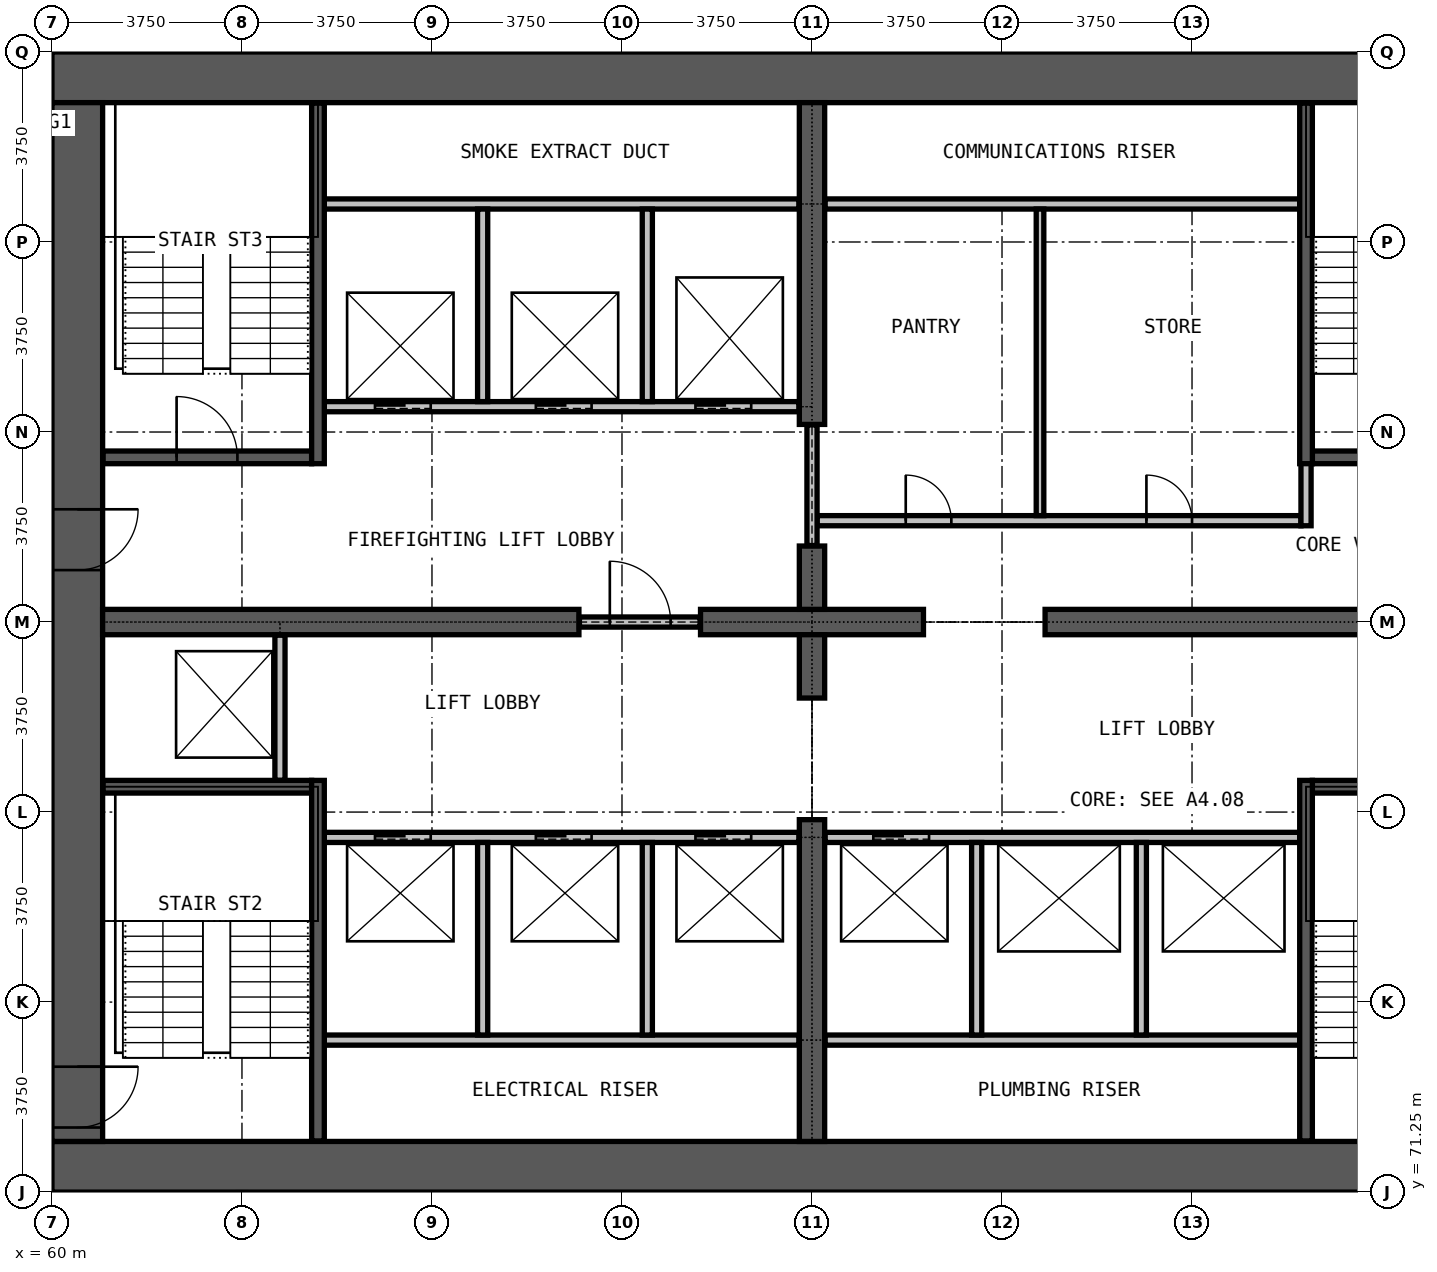
"""IFC4 building model, lengths in metres.
Left out: names, types, materials, properties, quantities, classifications, styles, units other than length and angle.
Written with IfcOpenShell. Run it as: python <this file> out.ifc"""

import sys

from ifc_helpers import new_model, si_unit, direction, frame, frame_2d, origin, place, context, subcontext, project, spatial, rectangle, extrude, element, fill, save


model = new_model("IFC4")
c1 = context("Model", 3, precision=1e-05, world=origin(), true_north=direction((0.0, 1.0)))
c2 = subcontext(c1, "Body", "Model", "MODEL_VIEW")
j1 = project(units=[si_unit("LENGTHUNIT", "METRE"), si_unit("PLANEANGLEUNIT", "RADIAN")], contexts=[c1])
p1 = place(None, origin())
s1 = spatial("IfcSite", under=j1, at=p1, CompositionType="ELEMENT")
p2 = place(p1, origin())
s2 = spatial("IfcBuilding", under=s1, at=p2, CompositionType="ELEMENT")
p3 = place(p2, frame((0.0, 0.0, 79.1)))
s3 = spatial("IfcBuildingStorey", under=s2, at=p3, CompositionType="ELEMENT", Elevation=79.1)
for number, where, z_axis, x_axis in (
    (1, (60.0, 71.75, 0.0), (0.0, 0.0, 1.0), (1.0, 0.0, 0.0)),
    (2, (90.0, 93.25, 0.0), (0.0, 0.0, 1.0), (-1.0, 0.0, 0.0)),
):
    element("IfcWall", number, at=place(p3, frame(where, z_axis=z_axis, x_axis=x_axis)), inside=s3, PredefinedType="SHEAR", context=c2, shape_type="SweptSolid", body=[
        extrude(rectangle(XDim=30.0, YDim=1.0, at=frame_2d((15.0, 0.0))), origin(), (0.0, 0.0, 1.0), 3.3),
    ])
p4 = place(p3, frame((60.5, 92.75, 0.0), z_axis=(0.0, 0.0, 1.0), x_axis=(0.0, -1.0, 0.0)))
e3 = element("IfcWall", 3, at=p4, inside=s3, PredefinedType="SHEAR", context=c2, shape_type="SweptSolid", body=[
    extrude(rectangle(XDim=20.5, YDim=1.0, at=frame_2d((10.25, 0.0))), origin(), (0.0, 0.0, 1.0), 3.3),
])
p5 = place(p4, frame((19.025, 0.0, 0.0)))
e4 = element("IfcOpeningElement", 4, at=p5, cuts=e3, PredefinedType="OPENING", context=c2, shape_type="SweptSolid", body=[
    extrude(rectangle(XDim=1.2, YDim=2.2, at=frame_2d((0.6, 1.1))), frame((0.0, 0.51, 0.0), z_axis=(0.0, -1.0, 0.0), x_axis=(1.0, 0.0, 0.0)), (0.0, 0.0, 1.0), 1.02),
])
p6 = place(p4, frame((8.025, 0.0, 0.0)))
e5 = element("IfcOpeningElement", 5, at=p6, cuts=e3, PredefinedType="OPENING", context=c2, shape_type="SweptSolid", body=[
    extrude(rectangle(XDim=1.2, YDim=2.2, at=frame_2d((0.6, 1.1))), frame((0.0, 0.51, 0.0), z_axis=(0.0, -1.0, 0.0), x_axis=(1.0, 0.0, 0.0)), (0.0, 0.0, 1.0), 1.02),
])
p7 = place(p3, frame((61.0, 82.5, 0.0), z_axis=(0.0, 0.0, 1.0), x_axis=(1.0, 0.0, 0.0)))
e6 = element("IfcWall", 6, at=p7, inside=s3, PredefinedType="SHEAR", context=c2, shape_type="SweptSolid", body=[
    extrude(rectangle(XDim=9.4, YDim=0.5, at=frame_2d((4.7, 0.0))), origin(), (0.0, 0.0, 1.0), 3.3),
])
p8 = place(p3, frame((72.8, 82.5, 0.0), z_axis=(0.0, 0.0, 1.0), x_axis=(1.0, 0.0, 0.0)))
e7 = element("IfcWall", 7, at=p8, inside=s3, PredefinedType="SHEAR", context=c2, shape_type="SweptSolid", body=[
    extrude(rectangle(XDim=4.4, YDim=0.5, at=frame_2d((2.2, 0.0))), origin(), (0.0, 0.0, 1.0), 3.3),
])
p9 = place(p3, frame((79.6, 82.5, 0.0), z_axis=(0.0, 0.0, 1.0), x_axis=(1.0, 0.0, 0.0)))
e8 = element("IfcWall", 8, at=p9, inside=s3, PredefinedType="SHEAR", context=c2, shape_type="SweptSolid", body=[
    extrude(rectangle(XDim=9.4, YDim=0.5, at=frame_2d((4.7, 0.0))), origin(), (0.0, 0.0, 1.0), 3.3),
])
p10 = place(p3, frame((75.0, 72.25, 0.0), z_axis=(0.0, 0.0, 1.0), x_axis=(0.0, 1.0, 0.0)))
e9 = element("IfcWall", 9, at=p10, inside=s3, PredefinedType="SHEAR", context=c2, shape_type="SweptSolid", body=[
    extrude(rectangle(XDim=6.35, YDim=0.5, at=frame_2d((3.175, 0.0))), origin(), (0.0, 0.0, 1.0), 3.3),
])
for number, where, z_axis, x_axis in (
    (10, (75.0, 81.0, 0.0), (0.0, 0.0, 1.0), (0.0, 1.0, 0.0)),
    (11, (75.0, 82.75, 0.0), (0.0, 0.0, 1.0), (0.0, 1.0, 0.0)),
):
    element("IfcWall", number, at=place(p3, frame(where, z_axis=z_axis, x_axis=x_axis)), inside=s3, PredefinedType="SHEAR", context=c2, shape_type="SweptSolid", body=[
        extrude(rectangle(XDim=1.25, YDim=0.5, at=frame_2d((0.625, 0.0))), origin(), (0.0, 0.0, 1.0), 3.3),
    ])
p11 = place(p3, frame((75.0, 86.4, 0.0), z_axis=(0.0, 0.0, 1.0), x_axis=(0.0, 1.0, 0.0)))
e12 = element("IfcWall", 12, at=p11, inside=s3, PredefinedType="SHEAR", context=c2, shape_type="SweptSolid", body=[
    extrude(rectangle(XDim=6.35, YDim=0.5, at=frame_2d((3.175, 0.0))), origin(), (0.0, 0.0, 1.0), 3.3),
])
p12 = place(p3, frame((70.41, 82.5, 0.0), z_axis=(0.0, 0.0, 1.0), x_axis=(1.0, 0.0, 0.0)))
e13 = element("IfcWall", 13, at=p12, inside=s3, PredefinedType="PARTITIONING", context=c2, shape_type="SweptSolid", body=[
    extrude(rectangle(XDim=2.38, YDim=0.2, at=frame_2d((1.19, 0.0))), origin(), (0.0, 0.0, 1.0), 2.4),
])
p13 = place(p12, frame((0.6, 0.0, 0.0)))
e14 = element("IfcOpeningElement", 14, at=p13, cuts=e13, PredefinedType="OPENING", context=c2, shape_type="SweptSolid", body=[
    extrude(rectangle(XDim=1.2, YDim=2.2, at=frame_2d((0.6, 1.1))), frame((0.0, 0.11, 0.0), z_axis=(0.0, -1.0, 0.0), x_axis=(1.0, 0.0, 0.0)), (0.0, 0.0, 1.0), 0.22),
])
p14 = place(p3, frame((75.1, 84.5, 0.0), z_axis=(0.0, 0.0, 1.0), x_axis=(1.0, 0.0, 0.0)))
e15 = element("IfcWall", 15, at=p14, inside=s3, PredefinedType="PARTITIONING", context=c2, shape_type="SweptSolid", body=[
    extrude(rectangle(XDim=9.55, YDim=0.2, at=frame_2d((4.775, 0.0))), origin(), (0.0, 0.0, 1.0), 3.0),
])
p15 = place(p14, frame((1.75, 0.0, 0.0)))
e16 = element("IfcOpeningElement", 16, at=p15, cuts=e15, PredefinedType="OPENING", context=c2, shape_type="SweptSolid", body=[
    extrude(rectangle(XDim=0.9, YDim=2.2, at=frame_2d((0.45, 1.1))), frame((0.0, 0.11, 0.0), z_axis=(0.0, -1.0, 0.0), x_axis=(1.0, 0.0, 0.0)), (0.0, 0.0, 1.0), 0.22),
])
p16 = place(p14, frame((6.5, 0.0, 0.0)))
e17 = element("IfcOpeningElement", 17, at=p16, cuts=e15, PredefinedType="OPENING", context=c2, shape_type="SweptSolid", body=[
    extrude(rectangle(XDim=0.9, YDim=2.2, at=frame_2d((0.45, 1.1))), frame((0.0, 0.11, 0.0), z_axis=(0.0, -1.0, 0.0), x_axis=(1.0, 0.0, 0.0)), (0.0, 0.0, 1.0), 0.22),
])
p17 = place(p3, frame((75.26, 90.75, 0.0), z_axis=(0.0, 0.0, 1.0), x_axis=(1.0, 0.0, 0.0)))
e18 = element("IfcWall", 18, at=p17, inside=s3, PredefinedType="PARTITIONING", context=c2, shape_type="SweptSolid", body=[
    extrude(rectangle(XDim=9.365, YDim=0.2, at=frame_2d((4.683, 0.0))), origin(), (0.0, 0.0, 1.0), 3.0),
])
p18 = place(p3, frame((75.0, 84.01, 0.0), z_axis=(0.0, 0.0, 1.0), x_axis=(0.0, 1.0, 0.0)))
e19 = element("IfcWall", 19, at=p18, inside=s3, PredefinedType="PARTITIONING", context=c2, shape_type="SweptSolid", body=[
    extrude(rectangle(XDim=2.38, YDim=0.2, at=frame_2d((1.19, 0.0))), origin(), (0.0, 0.0, 1.0), 2.4),
])
p19 = place(p3, frame((84.75, 84.4, 0.0), z_axis=(0.0, 0.0, 1.0), x_axis=(0.0, 1.0, 0.0)))
e20 = element("IfcWall", 20, at=p19, inside=s3, PredefinedType="PARTITIONING", context=c2, shape_type="SweptSolid", body=[
    extrude(rectangle(XDim=1.475, YDim=0.2, at=frame_2d((0.738, 0.0))), origin(), (0.0, 0.0, 1.0), 3.0),
])
p20 = place(p3, frame((79.5, 84.6, 0.0), z_axis=(0.0, 0.0, 1.0), x_axis=(0.0, 1.0, 0.0)))
e21 = element("IfcWall", 21, at=p20, inside=s3, PredefinedType="PARTITIONING", context=c2, shape_type="SweptSolid", body=[
    extrude(rectangle(XDim=6.05, YDim=0.15, at=frame_2d((3.025, 0.0))), origin(), (0.0, 0.0, 1.0), 3.0),
])
for number, where, z_axis, x_axis in (
    (22, (65.375, 74.25, 0.0), (0.0, 0.0, 1.0), (1.0, 0.0, 0.0)),
    (23, (75.26, 74.25, 0.0), (0.0, 0.0, 1.0), (1.0, 0.0, 0.0)),
):
    element("IfcWall", number, at=place(p3, frame(where, z_axis=z_axis, x_axis=x_axis)), inside=s3, PredefinedType="PARTITIONING", context=c2, shape_type="SweptSolid", body=[
        extrude(rectangle(XDim=9.365, YDim=0.2, at=frame_2d((4.683, 0.0))), origin(), (0.0, 0.0, 1.0), 3.0),
    ])
p21 = place(p3, frame((65.375, 78.25, 0.0), z_axis=(0.0, 0.0, 1.0), x_axis=(1.0, 0.0, 0.0)))
e24 = element("IfcWall", 24, at=p21, inside=s3, PredefinedType="PARTITIONING", context=c2, shape_type="SweptSolid", body=[
    extrude(rectangle(XDim=9.365, YDim=0.2, at=frame_2d((4.683, 0.0))), origin(), (0.0, 0.0, 1.0), 3.0),
])
p22 = place(p21, frame((1.0, 0.0, 0.0)))
e25 = element("IfcOpeningElement", 25, at=p22, cuts=e24, PredefinedType="OPENING", context=c2, shape_type="SweptSolid", body=[
    extrude(rectangle(XDim=1.1, YDim=2.2, at=frame_2d((0.55, 1.1))), frame((0.0, 0.11, 0.0), z_axis=(0.0, -1.0, 0.0), x_axis=(1.0, 0.0, 0.0)), (0.0, 0.0, 1.0), 0.22),
])
p23 = place(p21, frame((4.175, 0.0, 0.0)))
e26 = element("IfcOpeningElement", 26, at=p23, cuts=e24, PredefinedType="OPENING", context=c2, shape_type="SweptSolid", body=[
    extrude(rectangle(XDim=1.1, YDim=2.2, at=frame_2d((0.55, 1.1))), frame((0.0, 0.11, 0.0), z_axis=(0.0, -1.0, 0.0), x_axis=(1.0, 0.0, 0.0)), (0.0, 0.0, 1.0), 0.22),
])
p24 = place(p21, frame((7.325, 0.0, 0.0)))
e27 = element("IfcOpeningElement", 27, at=p24, cuts=e24, PredefinedType="OPENING", context=c2, shape_type="SweptSolid", body=[
    extrude(rectangle(XDim=1.1, YDim=2.2, at=frame_2d((0.55, 1.1))), frame((0.0, 0.11, 0.0), z_axis=(0.0, -1.0, 0.0), x_axis=(1.0, 0.0, 0.0)), (0.0, 0.0, 1.0), 0.22),
])
p25 = place(p3, frame((75.26, 78.25, 0.0), z_axis=(0.0, 0.0, 1.0), x_axis=(1.0, 0.0, 0.0)))
e28 = element("IfcWall", 28, at=p25, inside=s3, PredefinedType="PARTITIONING", context=c2, shape_type="SweptSolid", body=[
    extrude(rectangle(XDim=9.365, YDim=0.2, at=frame_2d((4.683, 0.0))), origin(), (0.0, 0.0, 1.0), 3.0),
])
p26 = place(p25, frame((0.95, 0.0, 0.0)))
e29 = element("IfcOpeningElement", 29, at=p26, cuts=e28, PredefinedType="OPENING", context=c2, shape_type="SweptSolid", body=[
    extrude(rectangle(XDim=1.1, YDim=2.2, at=frame_2d((0.55, 1.1))), frame((0.0, 0.11, 0.0), z_axis=(0.0, -1.0, 0.0), x_axis=(1.0, 0.0, 0.0)), (0.0, 0.0, 1.0), 0.22),
])
p27 = place(p3, frame((65.375, 86.75, 0.0), z_axis=(0.0, 0.0, 1.0), x_axis=(1.0, 0.0, 0.0)))
e30 = element("IfcWall", 30, at=p27, inside=s3, PredefinedType="PARTITIONING", context=c2, shape_type="SweptSolid", body=[
    extrude(rectangle(XDim=9.365, YDim=0.2, at=frame_2d((4.683, 0.0))), origin(), (0.0, 0.0, 1.0), 3.0),
])
p28 = place(p27, frame((1.0, 0.0, 0.0)))
e31 = element("IfcOpeningElement", 31, at=p28, cuts=e30, PredefinedType="OPENING", context=c2, shape_type="SweptSolid", body=[
    extrude(rectangle(XDim=1.1, YDim=2.2, at=frame_2d((0.55, 1.1))), frame((0.0, 0.11, 0.0), z_axis=(0.0, -1.0, 0.0), x_axis=(1.0, 0.0, 0.0)), (0.0, 0.0, 1.0), 0.22),
])
p29 = place(p27, frame((4.175, 0.0, 0.0)))
e32 = element("IfcOpeningElement", 32, at=p29, cuts=e30, PredefinedType="OPENING", context=c2, shape_type="SweptSolid", body=[
    extrude(rectangle(XDim=1.1, YDim=2.2, at=frame_2d((0.55, 1.1))), frame((0.0, 0.11, 0.0), z_axis=(0.0, -1.0, 0.0), x_axis=(1.0, 0.0, 0.0)), (0.0, 0.0, 1.0), 0.22),
])
p30 = place(p27, frame((7.325, 0.0, 0.0)))
e33 = element("IfcOpeningElement", 33, at=p30, cuts=e30, PredefinedType="OPENING", context=c2, shape_type="SweptSolid", body=[
    extrude(rectangle(XDim=1.1, YDim=2.2, at=frame_2d((0.55, 1.1))), frame((0.0, 0.11, 0.0), z_axis=(0.0, -1.0, 0.0), x_axis=(1.0, 0.0, 0.0)), (0.0, 0.0, 1.0), 0.22),
])
p31 = place(p3, frame((65.375, 90.75, 0.0), z_axis=(0.0, 0.0, 1.0), x_axis=(1.0, 0.0, 0.0)))
e34 = element("IfcWall", 34, at=p31, inside=s3, PredefinedType="PARTITIONING", context=c2, shape_type="SweptSolid", body=[
    extrude(rectangle(XDim=9.365, YDim=0.2, at=frame_2d((4.683, 0.0))), origin(), (0.0, 0.0, 1.0), 3.0),
])
p32 = place(p3, frame((64.5, 79.375, 0.0), z_axis=(0.0, 0.0, 1.0), x_axis=(0.0, 1.0, 0.0)))
e35 = element("IfcWall", 35, at=p32, inside=s3, PredefinedType="PARTITIONING", context=c2, shape_type="SweptSolid", body=[
    extrude(rectangle(XDim=2.865, YDim=0.2, at=frame_2d((1.433, 0.0))), origin(), (0.0, 0.0, 1.0), 3.0),
])
for number, where, z_axis, x_axis in (
    (36, (68.5, 74.35, 0.0), (0.0, 0.0, 1.0), (0.0, 1.0, 0.0)),
    (37, (68.5, 86.85, 0.0), (0.0, 0.0, 1.0), (0.0, 1.0, 0.0)),
    (38, (71.75, 74.35, 0.0), (0.0, 0.0, 1.0), (0.0, 1.0, 0.0)),
    (39, (71.75, 86.85, 0.0), (0.0, 0.0, 1.0), (0.0, 1.0, 0.0)),
    (40, (78.25, 74.35, 0.0), (0.0, 0.0, 1.0), (0.0, 1.0, 0.0)),
    (41, (81.5, 74.35, 0.0), (0.0, 0.0, 1.0), (0.0, 1.0, 0.0)),
):
    element("IfcWall", number, at=place(p3, frame(where, z_axis=z_axis, x_axis=x_axis)), inside=s3, PredefinedType="PARTITIONING", context=c2, shape_type="SweptSolid", body=[
        extrude(rectangle(XDim=3.8, YDim=0.2, at=frame_2d((1.9, 0.0))), origin(), (0.0, 0.0, 1.0), 3.0),
    ])
for number, where, z_axis, x_axis in (
    (42, (61.01, 79.25, 0.0), (0.0, 0.0, 1.0), (1.0, 0.0, 0.0)),
    (43, (84.875, 79.25, 0.0), (0.0, 0.0, 1.0), (1.0, 0.0, 0.0)),
):
    element("IfcWall", number, at=place(p3, frame(where, z_axis=z_axis, x_axis=x_axis)), inside=s3, PredefinedType="PARTITIONING", context=c2, shape_type="SweptSolid", body=[
        extrude(rectangle(XDim=4.115, YDim=0.25, at=frame_2d((2.058, 0.0))), origin(), (0.0, 0.0, 1.0), 3.0),
    ])
p33 = place(p3, frame((61.01, 85.75, 0.0), z_axis=(0.0, 0.0, 1.0), x_axis=(1.0, 0.0, 0.0)))
e44 = element("IfcWall", 44, at=p33, inside=s3, PredefinedType="PARTITIONING", context=c2, shape_type="SweptSolid", body=[
    extrude(rectangle(XDim=4.115, YDim=0.25, at=frame_2d((2.058, 0.0))), origin(), (0.0, 0.0, 1.0), 3.0),
])
p34 = place(p33, frame((1.45, 0.0, 0.0)))
e45 = element("IfcOpeningElement", 45, at=p34, cuts=e44, PredefinedType="OPENING", context=c2, shape_type="SweptSolid", body=[
    extrude(rectangle(XDim=1.2, YDim=2.2, at=frame_2d((0.6, 1.1))), frame((0.0, 0.135, 0.0), z_axis=(0.0, -1.0, 0.0), x_axis=(1.0, 0.0, 0.0)), (0.0, 0.0, 1.0), 0.27),
])
p35 = place(p3, frame((84.875, 85.75, 0.0), z_axis=(0.0, 0.0, 1.0), x_axis=(1.0, 0.0, 0.0)))
e46 = element("IfcWall", 46, at=p35, inside=s3, PredefinedType="PARTITIONING", context=c2, shape_type="SweptSolid", body=[
    extrude(rectangle(XDim=4.115, YDim=0.25, at=frame_2d((2.058, 0.0))), origin(), (0.0, 0.0, 1.0), 3.0),
])
for number, where, z_axis, x_axis in (
    (47, (65.25, 72.26, 0.0), (0.0, 0.0, 1.0), (0.0, 1.0, 0.0)),
    (48, (65.25, 85.625, 0.0), (0.0, 0.0, 1.0), (0.0, 1.0, 0.0)),
    (49, (84.75, 72.26, 0.0), (0.0, 0.0, 1.0), (0.0, 1.0, 0.0)),
    (50, (84.75, 85.625, 0.0), (0.0, 0.0, 1.0), (0.0, 1.0, 0.0)),
):
    element("IfcWall", number, at=place(p3, frame(where, z_axis=z_axis, x_axis=x_axis)), inside=s3, PredefinedType="PARTITIONING", context=c2, shape_type="SweptSolid", body=[
        extrude(rectangle(XDim=7.115, YDim=0.25, at=frame_2d((3.558, 0.0))), origin(), (0.0, 0.0, 1.0), 3.0),
    ])
p36 = place(p22, origin())
e51 = element("IfcDoor", 51, at=p36, inside=s3, OperationType="DOUBLE_DOOR_SLIDING", PredefinedType="DOOR", context=c2, shape_type="SweptSolid", body=[
    extrude(rectangle(XDim=1.1, YDim=2.2, at=frame_2d((0.55, 1.1))), frame((0.0, 0.025, 0.0), z_axis=(0.0, -1.0, 0.0), x_axis=(1.0, 0.0, 0.0)), (0.0, 0.0, 1.0), 0.05),
])
fill(e25, e51)
p37 = place(p23, origin())
e52 = element("IfcDoor", 52, at=p37, inside=s3, OperationType="DOUBLE_DOOR_SLIDING", PredefinedType="DOOR", context=c2, shape_type="SweptSolid", body=[
    extrude(rectangle(XDim=1.1, YDim=2.2, at=frame_2d((0.55, 1.1))), frame((0.0, 0.025, 0.0), z_axis=(0.0, -1.0, 0.0), x_axis=(1.0, 0.0, 0.0)), (0.0, 0.0, 1.0), 0.05),
])
fill(e26, e52)
p38 = place(p24, origin())
e53 = element("IfcDoor", 53, at=p38, inside=s3, OperationType="DOUBLE_DOOR_SLIDING", PredefinedType="DOOR", context=c2, shape_type="SweptSolid", body=[
    extrude(rectangle(XDim=1.1, YDim=2.2, at=frame_2d((0.55, 1.1))), frame((0.0, 0.025, 0.0), z_axis=(0.0, -1.0, 0.0), x_axis=(1.0, 0.0, 0.0)), (0.0, 0.0, 1.0), 0.05),
])
fill(e27, e53)
p39 = place(p26, origin())
e54 = element("IfcDoor", 54, at=p39, inside=s3, OperationType="DOUBLE_DOOR_SLIDING", PredefinedType="DOOR", context=c2, shape_type="SweptSolid", body=[
    extrude(rectangle(XDim=1.1, YDim=2.2, at=frame_2d((0.55, 1.1))), frame((0.0, 0.025, 0.0), z_axis=(0.0, -1.0, 0.0), x_axis=(1.0, 0.0, 0.0)), (0.0, 0.0, 1.0), 0.05),
])
fill(e29, e54)
p40 = place(p28, origin())
e55 = element("IfcDoor", 55, at=p40, inside=s3, OperationType="DOUBLE_DOOR_SLIDING", PredefinedType="DOOR", context=c2, shape_type="SweptSolid", body=[
    extrude(rectangle(XDim=1.1, YDim=2.2, at=frame_2d((0.55, 1.1))), frame((0.0, 0.025, 0.0), z_axis=(0.0, -1.0, 0.0), x_axis=(1.0, 0.0, 0.0)), (0.0, 0.0, 1.0), 0.05),
])
fill(e31, e55)
p41 = place(p29, origin())
e56 = element("IfcDoor", 56, at=p41, inside=s3, OperationType="DOUBLE_DOOR_SLIDING", PredefinedType="DOOR", context=c2, shape_type="SweptSolid", body=[
    extrude(rectangle(XDim=1.1, YDim=2.2, at=frame_2d((0.55, 1.1))), frame((0.0, 0.025, 0.0), z_axis=(0.0, -1.0, 0.0), x_axis=(1.0, 0.0, 0.0)), (0.0, 0.0, 1.0), 0.05),
])
fill(e32, e56)
p42 = place(p30, origin())
e57 = element("IfcDoor", 57, at=p42, inside=s3, OperationType="DOUBLE_DOOR_SLIDING", PredefinedType="DOOR", context=c2, shape_type="SweptSolid", body=[
    extrude(rectangle(XDim=1.1, YDim=2.2, at=frame_2d((0.55, 1.1))), frame((0.0, 0.025, 0.0), z_axis=(0.0, -1.0, 0.0), x_axis=(1.0, 0.0, 0.0)), (0.0, 0.0, 1.0), 0.05),
])
fill(e33, e57)
p43 = place(p13, origin())
e58 = element("IfcDoor", 58, at=p43, inside=s3, OperationType="SINGLE_SWING_RIGHT", PredefinedType="DOOR", context=c2, shape_type="SweptSolid", body=[
    extrude(rectangle(XDim=1.2, YDim=2.2, at=frame_2d((0.6, 1.1))), frame((0.0, 0.025, 0.0), z_axis=(0.0, -1.0, 0.0), x_axis=(1.0, 0.0, 0.0)), (0.0, 0.0, 1.0), 0.05),
])
fill(e14, e58)
p44 = place(p34, origin())
e59 = element("IfcDoor", 59, at=p44, inside=s3, OperationType="SINGLE_SWING_LEFT", PredefinedType="DOOR", context=c2, shape_type="SweptSolid", body=[
    extrude(rectangle(XDim=1.2, YDim=2.2, at=frame_2d((0.6, 1.1))), frame((0.0, 0.025, 0.0), z_axis=(0.0, -1.0, 0.0), x_axis=(1.0, 0.0, 0.0)), (0.0, 0.0, 1.0), 0.05),
])
fill(e45, e59)
p45 = place(p5, origin())
e60 = element("IfcDoor", 60, at=p45, inside=s3, OperationType="SINGLE_SWING_RIGHT", PredefinedType="DOOR", context=c2, shape_type="SweptSolid", body=[
    extrude(rectangle(XDim=1.2, YDim=2.2, at=frame_2d((0.6, 1.1))), frame((0.0, 0.025, 0.0), z_axis=(0.0, -1.0, 0.0), x_axis=(1.0, 0.0, 0.0)), (0.0, 0.0, 1.0), 0.05),
])
fill(e4, e60)
p46 = place(p6, origin())
e61 = element("IfcDoor", 61, at=p46, inside=s3, OperationType="SINGLE_SWING_RIGHT", PredefinedType="DOOR", context=c2, shape_type="SweptSolid", body=[
    extrude(rectangle(XDim=1.2, YDim=2.2, at=frame_2d((0.6, 1.1))), frame((0.0, 0.025, 0.0), z_axis=(0.0, -1.0, 0.0), x_axis=(1.0, 0.0, 0.0)), (0.0, 0.0, 1.0), 0.05),
])
fill(e5, e61)
p47 = place(p15, origin())
e62 = element("IfcDoor", 62, at=p47, inside=s3, OperationType="SINGLE_SWING_LEFT", PredefinedType="DOOR", context=c2, shape_type="SweptSolid", body=[
    extrude(rectangle(XDim=0.9, YDim=2.2, at=frame_2d((0.45, 1.1))), frame((0.0, 0.025, 0.0), z_axis=(0.0, -1.0, 0.0), x_axis=(1.0, 0.0, 0.0)), (0.0, 0.0, 1.0), 0.05),
])
fill(e16, e62)
p48 = place(p16, origin())
e63 = element("IfcDoor", 63, at=p48, inside=s3, OperationType="SINGLE_SWING_RIGHT", PredefinedType="DOOR", context=c2, shape_type="SweptSolid", body=[
    extrude(rectangle(XDim=0.9, YDim=2.2, at=frame_2d((0.45, 1.1))), frame((0.0, 0.025, 0.0), z_axis=(0.0, -1.0, 0.0), x_axis=(1.0, 0.0, 0.0)), (0.0, 0.0, 1.0), 0.05),
])
fill(e17, e63)
save(model, sys.argv[1])
